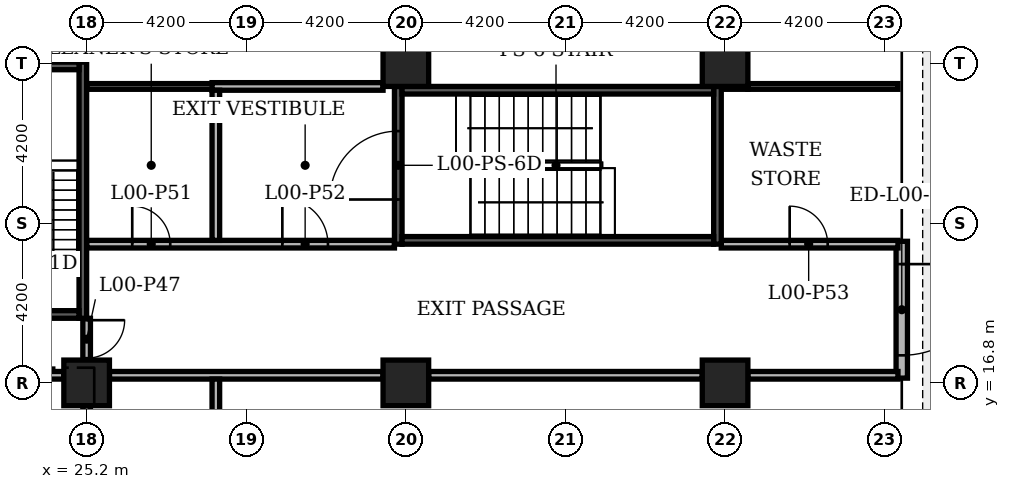
"""IFC4 building model, lengths in metres.
Left out: names, types, materials, properties, quantities, classifications, styles, units other than length and angle.
Written with IfcOpenShell. Run it as: python <this file> out.ifc"""

import sys

from ifc_helpers import new_model, si_unit, direction, frame, frame_2d, origin, origin_2d, place, context, subcontext, project, spatial, rectangle, extrude, element, fill, save


model = new_model("IFC4")
c1 = context("Model", 3, precision=1e-05, world=origin(), true_north=direction((0.0, 1.0)))
c2 = subcontext(c1, "Body", "Model", "MODEL_VIEW")
j1 = project(units=[si_unit("LENGTHUNIT", "METRE"), si_unit("PLANEANGLEUNIT", "RADIAN")], contexts=[c1])
p1 = place(None, origin())
s1 = spatial("IfcSite", under=j1, at=p1, CompositionType="ELEMENT")
p2 = place(p1, origin())
s2 = spatial("IfcBuilding", under=s1, at=p2, CompositionType="ELEMENT")
p3 = place(p2, origin())
s3 = spatial("IfcBuildingStorey", under=s2, at=p3, CompositionType="ELEMENT", Elevation=0.0)
for number, where, z_axis, x_axis in (
    (1, (25.2, 16.8, 0.0), (0.0, 0.0, 1.0), (1.0, 0.0, 0.0)),
    (2, (33.6, 16.8, 0.0), (0.0, 0.0, 1.0), (1.0, 0.0, 0.0)),
    (3, (33.6, 25.2, 0.0), (0.0, 0.0, 1.0), (1.0, 0.0, 0.0)),
    (4, (42.0, 16.8, 0.0), (0.0, 0.0, 1.0), (1.0, 0.0, 0.0)),
    (5, (42.0, 25.2, 0.0), (0.0, 0.0, 1.0), (1.0, 0.0, 0.0)),
):
    element("IfcColumn", number, at=place(p3, frame(where, z_axis=z_axis, x_axis=x_axis)), inside=s3, PredefinedType="COLUMN", context=c2, shape_type="SweptSolid", body=[
        extrude(rectangle(XDim=1.2, YDim=1.2, at=origin_2d()), origin(), (0.0, 0.0, 1.0), 7.2),
    ])
p4 = place(p3, frame((46.65, 16.925, 0.0), z_axis=(0.0, 0.0, 1.0), x_axis=(0.0, 1.0, 0.0)))
e6 = element("IfcWall", 6, at=p4, inside=s3, PredefinedType="STANDARD", context=c2, shape_type="SweptSolid", body=[
    extrude(rectangle(XDim=3.6, YDim=0.3, at=frame_2d((1.8, 0.0))), origin(), (0.0, 0.0, 1.0), 6.78),
])
p5 = place(p4, frame((0.6, 0.0, 0.0)))
e7 = element("IfcOpeningElement", 7, at=p5, cuts=e6, PredefinedType="OPENING", context=c2, shape_type="SweptSolid", body=[
    extrude(rectangle(XDim=2.4, YDim=2.4, at=frame_2d((1.2, 1.2))), frame((0.0, 0.16, 0.0), z_axis=(0.0, -1.0, 0.0), x_axis=(1.0, 0.0, 0.0)), (0.0, 0.0, 1.0), 0.32),
])
p6 = place(p3, frame((21.85, 17.0, 0.0), z_axis=(0.0, 0.0, 1.0), x_axis=(1.0, 0.0, 0.0)))
e8 = element("IfcWall", 8, at=p6, inside=s3, PredefinedType="PARTITIONING", context=c2, shape_type="SweptSolid", body=[
    extrude(rectangle(XDim=2.75, YDim=0.2, at=frame_2d((1.375, 0.0))), origin(), (0.0, 0.0, 1.0), 6.78),
])
for number, where, z_axis, x_axis in (
    (9, (25.8, 17.0, 0.0), (0.0, 0.0, 1.0), (1.0, 0.0, 0.0)),
    (10, (34.2, 17.0, 0.0), (0.0, 0.0, 1.0), (1.0, 0.0, 0.0)),
):
    element("IfcWall", number, at=place(p3, frame(where, z_axis=z_axis, x_axis=x_axis)), inside=s3, PredefinedType="PARTITIONING", context=c2, shape_type="SweptSolid", body=[
        extrude(rectangle(XDim=7.2, YDim=0.2, at=frame_2d((3.6, 0.0))), origin(), (0.0, 0.0, 1.0), 6.48),
    ])
p7 = place(p3, frame((42.6, 17.0, 0.0), z_axis=(0.0, 0.0, 1.0), x_axis=(1.0, 0.0, 0.0)))
e11 = element("IfcWall", 11, at=p7, inside=s3, PredefinedType="PARTITIONING", context=c2, shape_type="SweptSolid", body=[
    extrude(rectangle(XDim=3.95, YDim=0.2, at=frame_2d((1.975, 0.0))), origin(), (0.0, 0.0, 1.0), 6.48),
])
p8 = place(p3, frame((25.2, 20.45, 0.0), z_axis=(0.0, 0.0, 1.0), x_axis=(1.0, 0.0, 0.0)))
e12 = element("IfcWall", 12, at=p8, inside=s3, PredefinedType="PARTITIONING", context=c2, shape_type="SweptSolid", body=[
    extrude(rectangle(XDim=8.1, YDim=0.2, at=frame_2d((4.05, 0.0))), origin(), (0.0, 0.0, 1.0), 6.78),
])
p9 = place(p8, frame((1.2, 0.0, 0.0)))
e13 = element("IfcOpeningElement", 13, at=p9, cuts=e12, PredefinedType="OPENING", context=c2, shape_type="SweptSolid", body=[
    extrude(rectangle(XDim=1.0, YDim=2.1, at=frame_2d((0.5, 1.05))), frame((0.0, 0.11, 0.0), z_axis=(0.0, -1.0, 0.0), x_axis=(1.0, 0.0, 0.0)), (0.0, 0.0, 1.0), 0.22),
])
p10 = place(p8, frame((5.15, 0.0, 0.0)))
e14 = element("IfcOpeningElement", 14, at=p10, cuts=e12, PredefinedType="OPENING", context=c2, shape_type="SweptSolid", body=[
    extrude(rectangle(XDim=1.2, YDim=2.2, at=frame_2d((0.6, 1.1))), frame((0.0, 0.11, 0.0), z_axis=(0.0, -1.0, 0.0), x_axis=(1.0, 0.0, 0.0)), (0.0, 0.0, 1.0), 0.22),
])
p11 = place(p3, frame((41.9, 20.45, 0.0), z_axis=(0.0, 0.0, 1.0), x_axis=(1.0, 0.0, 0.0)))
e15 = element("IfcWall", 15, at=p11, inside=s3, PredefinedType="PARTITIONING", context=c2, shape_type="SweptSolid", body=[
    extrude(rectangle(XDim=4.65, YDim=0.2, at=frame_2d((2.325, 0.0))), origin(), (0.0, 0.0, 1.0), 6.38),
])
p12 = place(p11, frame((1.8, 0.0, 0.0)))
e16 = element("IfcOpeningElement", 16, at=p12, cuts=e15, PredefinedType="OPENING", context=c2, shape_type="SweptSolid", body=[
    extrude(rectangle(XDim=1.0, YDim=2.1, at=frame_2d((0.5, 1.05))), frame((0.0, 0.11, 0.0), z_axis=(0.0, -1.0, 0.0), x_axis=(1.0, 0.0, 0.0)), (0.0, 0.0, 1.0), 0.22),
])
p13 = place(p3, frame((25.2, 24.6, 0.0), z_axis=(0.0, 0.0, 1.0), x_axis=(1.0, 0.0, 0.0)))
e17 = element("IfcWall", 17, at=p13, inside=s3, PredefinedType="PARTITIONING", context=c2, shape_type="SweptSolid", body=[
    extrude(rectangle(XDim=3.5, YDim=0.15, at=frame_2d((1.75, 0.0))), origin(), (0.0, 0.0, 1.0), 6.78),
])
p14 = place(p3, frame((28.5, 24.6, 0.0), z_axis=(0.0, 0.0, 1.0), x_axis=(1.0, 0.0, 0.0)))
e18 = element("IfcWall", 18, at=p14, inside=s3, PredefinedType="PARTITIONING", context=c2, shape_type="SweptSolid", body=[
    extrude(rectangle(XDim=4.5, YDim=0.2, at=frame_2d((2.25, 0.0))), origin(), (0.0, 0.0, 1.0), 6.78),
])
p15 = place(p3, frame((41.9, 24.6, 0.0), z_axis=(0.0, 0.0, 1.0), x_axis=(1.0, 0.0, 0.0)))
e19 = element("IfcWall", 19, at=p15, inside=s3, PredefinedType="PARTITIONING", context=c2, shape_type="SweptSolid", body=[
    extrude(rectangle(XDim=0.7, YDim=0.15, at=frame_2d((0.35, 0.0))), origin(), (0.0, 0.0, 1.0), 6.78),
])
p16 = place(p3, frame((42.6, 24.6, 0.0), z_axis=(0.0, 0.0, 1.0), x_axis=(1.0, 0.0, 0.0)))
e20 = element("IfcWall", 20, at=p16, inside=s3, PredefinedType="PARTITIONING", context=c2, shape_type="SweptSolid", body=[
    extrude(rectangle(XDim=3.95, YDim=0.15, at=frame_2d((1.975, 0.0))), origin(), (0.0, 0.0, 1.0), 6.78),
])
p17 = place(p3, frame((25.2, 9.0, 0.0), z_axis=(0.0, 0.0, 1.0), x_axis=(0.0, 1.0, 0.0)))
e21 = element("IfcWall", 21, at=p17, inside=s3, PredefinedType="PARTITIONING", context=c2, shape_type="SweptSolid", body=[
    extrude(rectangle(XDim=7.2, YDim=0.2, at=frame_2d((3.6, 0.0))), origin(), (0.0, 0.0, 1.0), 6.48),
])
p18 = place(p17, frame((3.9, 0.0, 0.0)))
e22 = element("IfcOpeningElement", 22, at=p18, cuts=e21, PredefinedType="OPENING", context=c2, shape_type="SweptSolid", body=[
    extrude(rectangle(XDim=1.8, YDim=2.2, at=frame_2d((0.9, 1.1))), frame((0.0, 0.11, 0.0), z_axis=(0.0, -1.0, 0.0), x_axis=(1.0, 0.0, 0.0)), (0.0, 0.0, 1.0), 0.22),
])
p19 = place(p3, frame((25.2, 17.4, 0.0), z_axis=(0.0, 0.0, 1.0), x_axis=(0.0, 1.0, 0.0)))
e23 = element("IfcWall", 23, at=p19, inside=s3, PredefinedType="PARTITIONING", context=c2, shape_type="SweptSolid", body=[
    extrude(rectangle(XDim=1.1, YDim=0.2, at=frame_2d((0.55, 0.0))), origin(), (0.0, 0.0, 1.0), 6.38),
])
p20 = place(p19, frame((0.05, 0.0, 0.0)))
e24 = element("IfcOpeningElement", 24, at=p20, cuts=e23, PredefinedType="OPENING", context=c2, shape_type="SweptSolid", body=[
    extrude(rectangle(XDim=1.0, YDim=2.2, at=frame_2d((0.5, 1.1))), frame((0.0, 0.11, 0.0), z_axis=(0.0, -1.0, 0.0), x_axis=(1.0, 0.0, 0.0)), (0.0, 0.0, 1.0), 0.22),
])
p21 = place(p3, frame((28.6, -16.9, 0.0), z_axis=(0.0, 0.0, 1.0), x_axis=(0.0, 1.0, 0.0)))
e25 = element("IfcWall", 25, at=p21, inside=s3, PredefinedType="PARTITIONING", context=c2, shape_type="SweptSolid", body=[
    extrude(rectangle(XDim=33.8, YDim=0.2, at=frame_2d((16.9, 0.0))), origin(), (0.0, 0.0, 1.0), 6.48),
])
p22 = place(p21, frame((3.6, 0.0, 0.0)))
e26 = element("IfcOpeningElement", 26, at=p22, cuts=e25, PredefinedType="OPENING", context=c2, shape_type="SweptSolid", body=[
    extrude(rectangle(XDim=1.2, YDim=2.2, at=frame_2d((0.6, 1.1))), frame((0.0, 0.11, 0.0), z_axis=(0.0, -1.0, 0.0), x_axis=(1.0, 0.0, 0.0)), (0.0, 0.0, 1.0), 0.22),
])
p23 = place(p21, frame((12.1, 0.0, 0.0)))
e27 = element("IfcOpeningElement", 27, at=p23, cuts=e25, PredefinedType="OPENING", context=c2, shape_type="SweptSolid", body=[
    extrude(rectangle(XDim=1.2, YDim=2.2, at=frame_2d((0.6, 1.1))), frame((0.0, 0.11, 0.0), z_axis=(0.0, -1.0, 0.0), x_axis=(1.0, 0.0, 0.0)), (0.0, 0.0, 1.0), 0.22),
])
p24 = place(p21, frame((20.5, 0.0, 0.0)))
e28 = element("IfcOpeningElement", 28, at=p24, cuts=e25, PredefinedType="OPENING", context=c2, shape_type="SweptSolid", body=[
    extrude(rectangle(XDim=1.2, YDim=2.2, at=frame_2d((0.6, 1.1))), frame((0.0, 0.11, 0.0), z_axis=(0.0, -1.0, 0.0), x_axis=(1.0, 0.0, 0.0)), (0.0, 0.0, 1.0), 0.22),
])
p25 = place(p21, frame((29.0, 0.0, 0.0)))
e29 = element("IfcOpeningElement", 29, at=p25, cuts=e25, PredefinedType="OPENING", context=c2, shape_type="SweptSolid", body=[
    extrude(rectangle(XDim=1.2, YDim=2.2, at=frame_2d((0.6, 1.1))), frame((0.0, 0.11, 0.0), z_axis=(0.0, -1.0, 0.0), x_axis=(1.0, 0.0, 0.0)), (0.0, 0.0, 1.0), 0.22),
])
p26 = place(p3, frame((28.6, 20.55, 0.0), z_axis=(0.0, 0.0, 1.0), x_axis=(0.0, 1.0, 0.0)))
e30 = element("IfcWall", 30, at=p26, inside=s3, PredefinedType="PARTITIONING", context=c2, shape_type="SweptSolid", body=[
    extrude(rectangle(XDim=3.95, YDim=0.2, at=frame_2d((1.975, 0.0))), origin(), (0.0, 0.0, 1.0), 6.78),
])
p27 = place(p3, frame((25.1, 18.5, 0.0), z_axis=(0.0, 0.0, 1.0), x_axis=(0.0, 1.0, 0.0)))
e31 = element("IfcWall", 31, at=p27, inside=s3, PredefinedType="SOLIDWALL", context=c2, shape_type="SweptSolid", body=[
    extrude(rectangle(XDim=6.74, YDim=0.2, at=frame_2d((3.37, 0.0))), origin(), (0.0, 0.0, 1.0), 6.38),
])
p28 = place(p3, frame((22.15, 18.6, 0.0), z_axis=(0.0, 0.0, 1.0), x_axis=(1.0, 0.0, 0.0)))
e32 = element("IfcWall", 32, at=p28, inside=s3, PredefinedType="SOLIDWALL", context=c2, shape_type="SweptSolid", body=[
    extrude(rectangle(XDim=2.85, YDim=0.2, at=frame_2d((1.425, 0.0))), origin(), (0.0, 0.0, 1.0), 6.78),
])
p29 = place(p28, frame((0.875, 0.0, 0.0)))
e33 = element("IfcOpeningElement", 33, at=p29, cuts=e32, PredefinedType="OPENING", context=c2, shape_type="SweptSolid", body=[
    extrude(rectangle(XDim=1.1, YDim=2.2, at=frame_2d((0.55, 1.1))), frame((0.0, 0.11, 0.0), z_axis=(0.0, -1.0, 0.0), x_axis=(1.0, 0.0, 0.0)), (0.0, 0.0, 1.0), 0.22),
])
p30 = place(p3, frame((22.15, 25.14, 0.0), z_axis=(0.0, 0.0, 1.0), x_axis=(1.0, 0.0, 0.0)))
e34 = element("IfcWall", 34, at=p30, inside=s3, PredefinedType="SOLIDWALL", context=c2, shape_type="SweptSolid", body=[
    extrude(rectangle(XDim=2.85, YDim=0.2, at=frame_2d((1.425, 0.0))), origin(), (0.0, 0.0, 1.0), 6.48),
])
p31 = place(p3, frame((33.4, 20.45, 0.0), z_axis=(0.0, 0.0, 1.0), x_axis=(0.0, 1.0, 0.0)))
e35 = element("IfcWall", 35, at=p31, inside=s3, PredefinedType="SOLIDWALL", context=c2, shape_type="SweptSolid", body=[
    extrude(rectangle(XDim=4.15, YDim=0.2, at=frame_2d((2.075, 0.0))), origin(), (0.0, 0.0, 1.0), 6.38),
])
p32 = place(p31, frame((1.175, 0.0, 0.0)))
e36 = element("IfcOpeningElement", 36, at=p32, cuts=e35, PredefinedType="OPENING", context=c2, shape_type="SweptSolid", body=[
    extrude(rectangle(XDim=1.8, YDim=2.2, at=frame_2d((0.9, 1.1))), frame((0.0, 0.11, 0.0), z_axis=(0.0, -1.0, 0.0), x_axis=(1.0, 0.0, 0.0)), (0.0, 0.0, 1.0), 0.22),
])
p33 = place(p3, frame((41.8, 20.45, 0.0), z_axis=(0.0, 0.0, 1.0), x_axis=(0.0, 1.0, 0.0)))
e37 = element("IfcWall", 37, at=p33, inside=s3, PredefinedType="SOLIDWALL", context=c2, shape_type="SweptSolid", body=[
    extrude(rectangle(XDim=4.15, YDim=0.2, at=frame_2d((2.075, 0.0))), origin(), (0.0, 0.0, 1.0), 6.38),
])
for number, where, z_axis, x_axis in (
    (38, (33.5, 20.55, 0.0), (0.0, 0.0, 1.0), (1.0, 0.0, 0.0)),
    (39, (33.5, 24.5, 0.0), (0.0, 0.0, 1.0), (1.0, 0.0, 0.0)),
):
    element("IfcWall", number, at=place(p3, frame(where, z_axis=z_axis, x_axis=x_axis)), inside=s3, PredefinedType="SOLIDWALL", context=c2, shape_type="SweptSolid", body=[
        extrude(rectangle(XDim=8.2, YDim=0.2, at=frame_2d((4.1, 0.0))), origin(), (0.0, 0.0, 1.0), 7.0),
    ])
p34 = place(p5, frame((2.4, 0.0, 0.0), z_axis=(0.0, 0.0, 1.0), x_axis=(-1.0, 0.0, 0.0)))
e40 = element("IfcDoor", 40, at=p34, inside=s3, OperationType="SINGLE_SWING_RIGHT", PredefinedType="DOOR", context=c2, shape_type="SweptSolid", body=[
    extrude(rectangle(XDim=2.4, YDim=2.4, at=frame_2d((1.2, 1.2))), frame((0.0, 0.025, 0.0), z_axis=(0.0, -1.0, 0.0), x_axis=(1.0, 0.0, 0.0)), (0.0, 0.0, 1.0), 0.05),
])
fill(e7, e40)
p35 = place(p20, origin())
e41 = element("IfcDoor", 41, at=p35, inside=s3, OperationType="SINGLE_SWING_RIGHT", PredefinedType="DOOR", context=c2, shape_type="SweptSolid", body=[
    extrude(rectangle(XDim=1.0, YDim=2.2, at=frame_2d((0.5, 1.1))), frame((0.0, 0.025, 0.0), z_axis=(0.0, -1.0, 0.0), x_axis=(1.0, 0.0, 0.0)), (0.0, 0.0, 1.0), 0.05),
])
fill(e24, e41)
p36 = place(p9, origin())
e42 = element("IfcDoor", 42, at=p36, inside=s3, OperationType="SINGLE_SWING_LEFT", PredefinedType="DOOR", context=c2, shape_type="SweptSolid", body=[
    extrude(rectangle(XDim=1.0, YDim=2.1, at=frame_2d((0.5, 1.05))), frame((0.0, 0.025, 0.0), z_axis=(0.0, -1.0, 0.0), x_axis=(1.0, 0.0, 0.0)), (0.0, 0.0, 1.0), 0.05),
])
fill(e13, e42)
p37 = place(p10, origin())
e43 = element("IfcDoor", 43, at=p37, inside=s3, OperationType="SINGLE_SWING_LEFT", PredefinedType="DOOR", context=c2, shape_type="SweptSolid", body=[
    extrude(rectangle(XDim=1.2, YDim=2.2, at=frame_2d((0.6, 1.1))), frame((0.0, 0.025, 0.0), z_axis=(0.0, -1.0, 0.0), x_axis=(1.0, 0.0, 0.0)), (0.0, 0.0, 1.0), 0.05),
])
fill(e14, e43)
p38 = place(p12, origin())
e44 = element("IfcDoor", 44, at=p38, inside=s3, OperationType="SINGLE_SWING_LEFT", PredefinedType="DOOR", context=c2, shape_type="SweptSolid", body=[
    extrude(rectangle(XDim=1.0, YDim=2.1, at=frame_2d((0.5, 1.05))), frame((0.0, 0.025, 0.0), z_axis=(0.0, -1.0, 0.0), x_axis=(1.0, 0.0, 0.0)), (0.0, 0.0, 1.0), 0.05),
])
fill(e16, e44)
p39 = place(p32, origin())
e45 = element("IfcDoor", 45, at=p39, inside=s3, OperationType="DOUBLE_DOOR_SINGLE_SWING", PredefinedType="DOOR", context=c2, shape_type="SweptSolid", body=[
    extrude(rectangle(XDim=1.8, YDim=2.2, at=frame_2d((0.9, 1.1))), frame((0.0, 0.025, 0.0), z_axis=(0.0, -1.0, 0.0), x_axis=(1.0, 0.0, 0.0)), (0.0, 0.0, 1.0), 0.05),
])
fill(e36, e45)
save(model, sys.argv[1])
